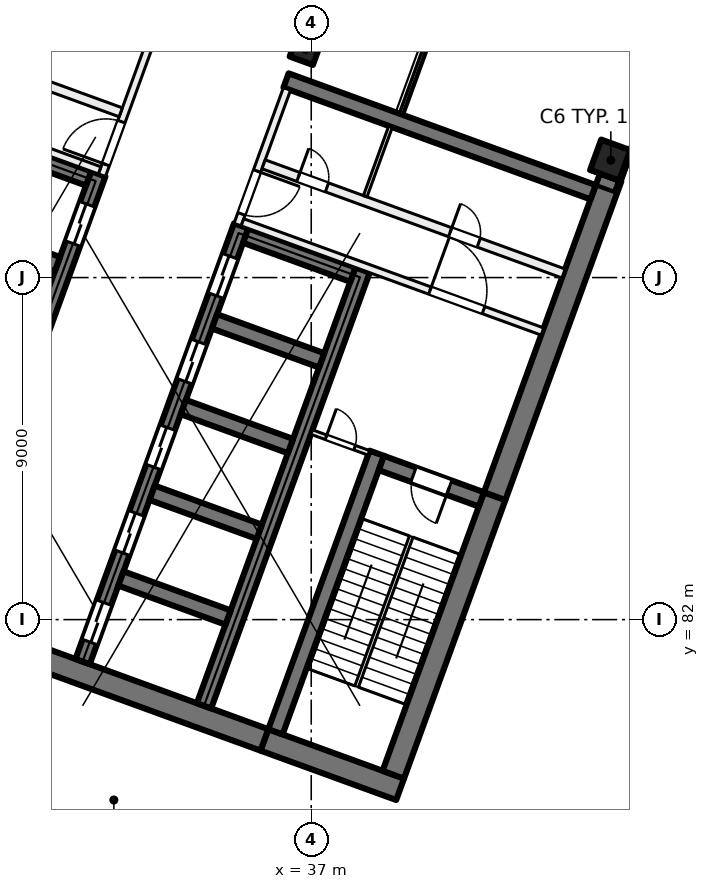
"""IFC4 building model, lengths in metres.
Left out: names, types, materials, properties, quantities, classifications, styles, units other than length and angle.
Written with IfcOpenShell. Run it as: python <this file> out.ifc"""

import sys

from ifc_helpers import new_model, si_unit, direction, frame, frame_2d, origin, origin_2d, place, context, subcontext, project, spatial, rectangle, extrude, element, fill, save


model = new_model("IFC4")
c1 = context("Model", 3, precision=1e-05, world=origin(), true_north=direction((0.0, 1.0)))
c2 = subcontext(c1, "Body", "Model", "MODEL_VIEW")
j1 = project(units=[si_unit("LENGTHUNIT", "METRE"), si_unit("PLANEANGLEUNIT", "RADIAN")], contexts=[c1])
p1 = place(None, origin())
s1 = spatial("IfcSite", under=j1, at=p1, CompositionType="ELEMENT")
p2 = place(p1, origin())
s2 = spatial("IfcBuilding", under=s1, at=p2, CompositionType="ELEMENT")
p3 = place(p2, frame((0.0, 0.0, 129.0)))
s3 = spatial("IfcBuildingStorey", under=s2, at=p3, CompositionType="ELEMENT", Elevation=129.0)
p4 = place(p3, frame((36.849, 97.011, 0.0), z_axis=(0.0, 0.0, 1.0), x_axis=(-0.342020143326, -0.939692620786, 0.0)))
e1 = element("IfcColumn", 1, at=p4, inside=s3, PredefinedType="COLUMN", context=c2, shape_type="SweptSolid", body=[
    extrude(rectangle(XDim=0.65, YDim=0.65, at=origin_2d()), origin(), (0.0, 0.0, 1.0), 5.5),
])
p5 = place(p3, frame((44.884, 94.087, 0.0), z_axis=(0.0, 0.0, 1.0), x_axis=(-0.342020143326, -0.939692620786, 0.0)))
e2 = element("IfcColumn", 2, at=p5, inside=s3, PredefinedType="COLUMN", context=c2, shape_type="SweptSolid", body=[
    extrude(rectangle(XDim=0.85, YDim=0.85, at=origin_2d()), origin(), (0.0, 0.0, 1.0), 5.5),
])
p6 = place(p3, frame((39.338, 77.535, 0.0), z_axis=(0.0, 0.0, 1.0), x_axis=(-0.939701471648, 0.341995824804, 0.0)))
e3 = element("IfcWall", 3, at=p6, inside=s3, PredefinedType="SHEAR", context=c2, shape_type="SweptSolid", body=[
    extrude(rectangle(XDim=3.8, YDim=0.6, at=frame_2d((1.9, 0.0))), origin(), (0.0, 0.0, 1.0), 5.5),
])
p7 = place(p3, frame((35.767, 78.835, 0.0), z_axis=(0.0, 0.0, 1.0), x_axis=(-0.939692894512, 0.342019391267, 0.0)))
e4 = element("IfcWall", 4, at=p7, inside=s3, PredefinedType="SHEAR", context=c2, shape_type="SweptSolid", body=[
    extrude(rectangle(XDim=14.4, YDim=0.6, at=frame_2d((7.2, 0.0))), origin(), (0.0, 0.0, 1.0), 5.5),
])
p8 = place(p3, frame((39.159, 77.92, 0.0), z_axis=(0.0, 0.0, 1.0), x_axis=(0.342016982193, 0.939693771338, 0.0)))
e5 = element("IfcWall", 5, at=p8, inside=s3, PredefinedType="SHEAR", context=c2, shape_type="SweptSolid", body=[
    extrude(rectangle(XDim=7.8, YDim=0.6, at=frame_2d((3.9, 0.0))), origin(), (0.0, 0.0, 1.0), 5.5),
])
p9 = place(p3, frame((41.827, 85.249, 0.0), z_axis=(0.0, 0.0, 1.0), x_axis=(0.342017595281, 0.939693548195, 0.0)))
e6 = element("IfcWall", 6, at=p9, inside=s3, PredefinedType="SHEAR", context=c2, shape_type="SweptSolid", body=[
    extrude(rectangle(XDim=8.925, YDim=0.6, at=frame_2d((4.462, 0.0))), origin(), (0.0, 0.0, 1.0), 5.5),
])
p10 = place(p3, frame((36.058, 79.048, 0.0), z_axis=(0.0, 0.0, 1.0), x_axis=(0.342016982193, 0.939693771338, 0.0)))
e7 = element("IfcWall", 7, at=p10, inside=s3, PredefinedType="SHEAR", context=c2, shape_type="SweptSolid", body=[
    extrude(rectangle(XDim=7.8, YDim=0.4, at=frame_2d((3.9, 0.0))), origin(), (0.0, 0.0, 1.0), 5.5),
])
p11 = place(p3, frame((41.476, 85.164, 0.0), z_axis=(0.0, 0.0, 1.0), x_axis=(-0.939678810556, 0.342058084236, 0.0)))
e8 = element("IfcWall", 8, at=p11, inside=s3, PredefinedType="SHEAR", context=c2, shape_type="SweptSolid", body=[
    extrude(rectangle(XDim=2.8, YDim=0.4, at=frame_2d((1.4, 0.0))), origin(), (0.0, 0.0, 1.0), 5.5),
])
p12 = place(p11, frame((0.9, 0.0, 0.0)))
e9 = element("IfcOpeningElement", 9, at=p12, cuts=e8, PredefinedType="OPENING", context=c2, shape_type="SweptSolid", body=[
    extrude(rectangle(XDim=1.0, YDim=2.1, at=frame_2d((0.5, 1.05))), frame((0.0, 0.21, 0.0), z_axis=(0.0, -1.0, 0.0), x_axis=(1.0, 0.0, 0.0)), (0.0, 0.0, 1.0), 0.42),
])
p13 = place(p3, frame((30.984, 80.895, 0.0), z_axis=(0.0, 0.0, 1.0), x_axis=(0.342021021735, 0.939692301071, 0.0)))
e10 = element("IfcWall", 10, at=p13, inside=s3, PredefinedType="SHEAR", context=c2, shape_type="SweptSolid", body=[
    extrude(rectangle(XDim=12.2, YDim=0.4, at=frame_2d((6.1, 0.0))), origin(), (0.0, 0.0, 1.0), 5.5),
])
p14 = place(p13, frame((0.55, 0.0, 0.0)))
e11 = element("IfcOpeningElement", 11, at=p14, cuts=e10, PredefinedType="OPENING", context=c2, shape_type="SweptSolid", body=[
    extrude(rectangle(XDim=1.1, YDim=2.1, at=frame_2d((0.55, 1.05))), frame((0.0, 0.21, 0.0), z_axis=(0.0, -1.0, 0.0), x_axis=(1.0, 0.0, 0.0)), (0.0, 0.0, 1.0), 0.42),
])
p15 = place(p13, frame((3.05, 0.0, 0.0)))
e12 = element("IfcOpeningElement", 12, at=p15, cuts=e10, PredefinedType="OPENING", context=c2, shape_type="SweptSolid", body=[
    extrude(rectangle(XDim=1.1, YDim=2.1, at=frame_2d((0.55, 1.05))), frame((0.0, 0.21, 0.0), z_axis=(0.0, -1.0, 0.0), x_axis=(1.0, 0.0, 0.0)), (0.0, 0.0, 1.0), 0.42),
])
p16 = place(p13, frame((5.45, 0.0, 0.0)))
e13 = element("IfcOpeningElement", 13, at=p16, cuts=e10, PredefinedType="OPENING", context=c2, shape_type="SweptSolid", body=[
    extrude(rectangle(XDim=1.1, YDim=2.1, at=frame_2d((0.55, 1.05))), frame((0.0, 0.21, 0.0), z_axis=(0.0, -1.0, 0.0), x_axis=(1.0, 0.0, 0.0)), (0.0, 0.0, 1.0), 0.42),
])
p17 = place(p13, frame((7.85, 0.0, 0.0)))
e14 = element("IfcOpeningElement", 14, at=p17, cuts=e10, PredefinedType="OPENING", context=c2, shape_type="SweptSolid", body=[
    extrude(rectangle(XDim=1.1, YDim=2.1, at=frame_2d((0.55, 1.05))), frame((0.0, 0.21, 0.0), z_axis=(0.0, -1.0, 0.0), x_axis=(1.0, 0.0, 0.0)), (0.0, 0.0, 1.0), 0.42),
])
p18 = place(p13, frame((10.25, 0.0, 0.0)))
e15 = element("IfcOpeningElement", 15, at=p18, cuts=e10, PredefinedType="OPENING", context=c2, shape_type="SweptSolid", body=[
    extrude(rectangle(XDim=1.1, YDim=2.1, at=frame_2d((0.55, 1.05))), frame((0.0, 0.21, 0.0), z_axis=(0.0, -1.0, 0.0), x_axis=(1.0, 0.0, 0.0)), (0.0, 0.0, 1.0), 0.42),
])
p19 = place(p3, frame((34.178, 79.732, 0.0), z_axis=(0.0, 0.0, 1.0), x_axis=(0.342014590177, 0.939694641948, 0.0)))
e16 = element("IfcWall", 16, at=p19, inside=s3, PredefinedType="SHEAR", context=c2, shape_type="SweptSolid", body=[
    extrude(rectangle(XDim=12.2, YDim=0.4, at=frame_2d((6.1, 0.0))), origin(), (0.0, 0.0, 1.0), 5.5),
])
for number, where, z_axis, x_axis in (
    (17, (34.812, 82.056, 0.0), (0.0, 0.0, 1.0), (-0.94, 0.342, 0.0)),
    (18, (35.632, 84.311, 0.0), (0.0, 0.0, 1.0), (-0.94, 0.342, 0.0)),
    (19, (36.453, 86.566, 0.0), (0.0, 0.0, 1.0), (-0.94, 0.342, 0.0)),
    (20, (37.274, 88.822, 0.0), (0.0, 0.0, 1.0), (-0.94, 0.342, 0.0)),
):
    element("IfcWall", number, at=place(p3, frame(where, z_axis=z_axis, x_axis=x_axis)), inside=s3, PredefinedType="SHEAR", context=c2, shape_type="SweptSolid", body=[
        extrude(rectangle(XDim=3.0, YDim=0.4, at=frame_2d((1.5, 0.0))), origin(), (0.0, 0.0, 1.0), 5.5),
    ])
p20 = place(p3, frame((38.095, 91.077, 0.0), z_axis=(0.0, 0.0, 1.0), x_axis=(-0.939676934218, 0.342063238742, 0.0)))
e21 = element("IfcWall", 21, at=p20, inside=s3, PredefinedType="SHEAR", context=c2, shape_type="SweptSolid", body=[
    extrude(rectangle(XDim=3.0, YDim=0.4, at=frame_2d((1.5, 0.0))), origin(), (0.0, 0.0, 1.0), 5.5),
])
p21 = place(p3, frame((27.225, 82.263, 0.0), z_axis=(0.0, 0.0, 1.0), x_axis=(0.342014590177, 0.939694641948, 0.0)))
e22 = element("IfcWall", 22, at=p21, inside=s3, PredefinedType="SHEAR", context=c2, shape_type="SweptSolid", body=[
    extrude(rectangle(XDim=12.2, YDim=0.4, at=frame_2d((6.1, 0.0))), origin(), (0.0, 0.0, 1.0), 5.5),
])
p22 = place(p21, frame((0.55, 0.0, 0.0)))
e23 = element("IfcOpeningElement", 23, at=p22, cuts=e22, PredefinedType="OPENING", context=c2, shape_type="SweptSolid", body=[
    extrude(rectangle(XDim=1.1, YDim=2.1, at=frame_2d((0.55, 1.05))), frame((0.0, 0.21, 0.0), z_axis=(0.0, -1.0, 0.0), x_axis=(1.0, 0.0, 0.0)), (0.0, 0.0, 1.0), 0.42),
])
p23 = place(p21, frame((3.05, 0.0, 0.0)))
e24 = element("IfcOpeningElement", 24, at=p23, cuts=e22, PredefinedType="OPENING", context=c2, shape_type="SweptSolid", body=[
    extrude(rectangle(XDim=1.1, YDim=2.1, at=frame_2d((0.55, 1.05))), frame((0.0, 0.21, 0.0), z_axis=(0.0, -1.0, 0.0), x_axis=(1.0, 0.0, 0.0)), (0.0, 0.0, 1.0), 0.42),
])
p24 = place(p21, frame((5.45, 0.0, 0.0)))
e25 = element("IfcOpeningElement", 25, at=p24, cuts=e22, PredefinedType="OPENING", context=c2, shape_type="SweptSolid", body=[
    extrude(rectangle(XDim=1.1, YDim=2.1, at=frame_2d((0.55, 1.05))), frame((0.0, 0.21, 0.0), z_axis=(0.0, -1.0, 0.0), x_axis=(1.0, 0.0, 0.0)), (0.0, 0.0, 1.0), 0.42),
])
p25 = place(p21, frame((10.25, 0.0, 0.0)))
e26 = element("IfcOpeningElement", 26, at=p25, cuts=e22, PredefinedType="OPENING", context=c2, shape_type="SweptSolid", body=[
    extrude(rectangle(XDim=1.1, YDim=2.1, at=frame_2d((0.55, 1.05))), frame((0.0, 0.21, 0.0), z_axis=(0.0, -1.0, 0.0), x_axis=(1.0, 0.0, 0.0)), (0.0, 0.0, 1.0), 0.42),
])
for number, where, z_axis, x_axis in (
    (27, (30.32, 91.353, 0.0), (0.0, 0.0, 1.0), (-0.94, 0.342, 0.0)),
    (28, (31.141, 93.608, 0.0), (0.0, 0.0, 1.0), (-0.94, 0.342, 0.0)),
):
    element("IfcWall", number, at=place(p3, frame(where, z_axis=z_axis, x_axis=x_axis)), inside=s3, PredefinedType="SHEAR", context=c2, shape_type="SweptSolid", body=[
        extrude(rectangle(XDim=3.0, YDim=0.4, at=frame_2d((1.5, 0.0))), origin(), (0.0, 0.0, 1.0), 5.5),
    ])
p26 = place(p3, frame((44.418, 93.245, 0.0), z_axis=(0.0, 0.0, 1.0), x_axis=(-0.93969060187, 0.342025690201, 0.0)))
e29 = element("IfcWall", 29, at=p26, inside=s3, PredefinedType="SHEAR", context=c2, shape_type="SweptSolid", body=[
    extrude(rectangle(XDim=8.6, YDim=0.4, at=frame_2d((4.3, 0.0))), origin(), (0.0, 0.0, 1.0), 5.5),
])
p27 = place(p3, frame((31.491, 93.693, 0.0), z_axis=(0.0, 0.0, 1.0), x_axis=(0.341995824804, 0.939701471648, 0.0)))
e30 = element("IfcWall", 30, at=p27, inside=s3, PredefinedType="PARTITIONING", context=c2, shape_type="SweptSolid", body=[
    extrude(rectangle(XDim=3.8, YDim=0.2, at=frame_2d((1.9, 0.0))), origin(), (0.0, 0.0, 1.0), 5.125),
])
p28 = place(p27, frame((0.3, 0.0, 0.0)))
e31 = element("IfcOpeningElement", 31, at=p28, cuts=e30, PredefinedType="OPENING", context=c2, shape_type="SweptSolid", body=[
    extrude(rectangle(XDim=1.2, YDim=2.1, at=frame_2d((0.6, 1.05))), frame((0.0, 0.11, 0.0), z_axis=(0.0, -1.0, 0.0), x_axis=(1.0, 0.0, 0.0)), (0.0, 0.0, 1.0), 0.22),
])
p29 = place(p3, frame((23.538, 96.694, 0.0), z_axis=(0.0, 0.0, 1.0), x_axis=(0.939691552312, -0.342023078919, 0.0)))
e32 = element("IfcWall", 32, at=p29, inside=s3, PredefinedType="PARTITIONING", context=c2, shape_type="SweptSolid", body=[
    extrude(rectangle(XDim=8.4, YDim=0.2, at=frame_2d((4.2, 0.0))), origin(), (0.0, 0.0, 1.0), 5.125),
])
p30 = place(p29, frame((1.65, 0.0, 0.0)))
e33 = element("IfcOpeningElement", 33, at=p30, cuts=e32, PredefinedType="OPENING", context=c2, shape_type="SweptSolid", body=[
    extrude(rectangle(XDim=1.5, YDim=2.1, at=frame_2d((0.75, 1.05))), frame((0.0, 0.11, 0.0), z_axis=(0.0, -1.0, 0.0), x_axis=(1.0, 0.0, 0.0)), (0.0, 0.0, 1.0), 0.22),
])
p31 = place(p3, frame((24.094, 98.221, 0.0), z_axis=(0.0, 0.0, 1.0), x_axis=(0.939691552312, -0.342023078919, 0.0)))
e34 = element("IfcWall", 34, at=p31, inside=s3, PredefinedType="PARTITIONING", context=c2, shape_type="SweptSolid", body=[
    extrude(rectangle(XDim=8.4, YDim=0.25, at=frame_2d((4.2, 0.0))), origin(), (0.0, 0.0, 1.0), 5.125),
])
p32 = place(p31, frame((3.8, 0.0, 0.0)))
e35 = element("IfcOpeningElement", 35, at=p32, cuts=e34, PredefinedType="OPENING", context=c2, shape_type="SweptSolid", body=[
    extrude(rectangle(XDim=0.8, YDim=2.1, at=frame_2d((0.4, 1.05))), frame((0.0, 0.135, 0.0), z_axis=(0.0, -1.0, 0.0), x_axis=(1.0, 0.0, 0.0)), (0.0, 0.0, 1.0), 0.27),
])
p33 = place(p3, frame((36.362, 95.964, 0.0), z_axis=(0.0, 0.0, 1.0), x_axis=(-0.341995824804, -0.939701471648, 0.0)))
e36 = element("IfcWall", 36, at=p33, inside=s3, PredefinedType="PARTITIONING", context=c2, shape_type="SweptSolid", body=[
    extrude(rectangle(XDim=3.8, YDim=0.2, at=frame_2d((1.9, 0.0))), origin(), (0.0, 0.0, 1.0), 5.125),
])
p34 = place(p33, frame((2.3, 0.0, 0.0)))
e37 = element("IfcOpeningElement", 37, at=p34, cuts=e36, PredefinedType="OPENING", context=c2, shape_type="SweptSolid", body=[
    extrude(rectangle(XDim=1.2, YDim=2.1, at=frame_2d((0.6, 1.05))), frame((0.0, 0.11, 0.0), z_axis=(0.0, -1.0, 0.0), x_axis=(1.0, 0.0, 0.0)), (0.0, 0.0, 1.0), 0.22),
])
p35 = place(p3, frame((35.19, 92.453, 0.0), z_axis=(0.0, 0.0, 1.0), x_axis=(0.939691552312, -0.342023078919, 0.0)))
e38 = element("IfcWall", 38, at=p35, inside=s3, PredefinedType="PARTITIONING", context=c2, shape_type="SweptSolid", body=[
    extrude(rectangle(XDim=8.4, YDim=0.2, at=frame_2d((4.2, 0.0))), origin(), (0.0, 0.0, 1.0), 5.125),
])
p36 = place(p35, frame((5.25, 0.0, 0.0)))
e39 = element("IfcOpeningElement", 39, at=p36, cuts=e38, PredefinedType="OPENING", context=c2, shape_type="SweptSolid", body=[
    extrude(rectangle(XDim=1.5, YDim=2.1, at=frame_2d((0.75, 1.05))), frame((0.0, 0.11, 0.0), z_axis=(0.0, -1.0, 0.0), x_axis=(1.0, 0.0, 0.0)), (0.0, 0.0, 1.0), 0.22),
])
p37 = place(p3, frame((35.746, 93.98, 0.0), z_axis=(0.0, 0.0, 1.0), x_axis=(0.939691552312, -0.342023078919, 0.0)))
e40 = element("IfcWall", 40, at=p37, inside=s3, PredefinedType="PARTITIONING", context=c2, shape_type="SweptSolid", body=[
    extrude(rectangle(XDim=8.4, YDim=0.25, at=frame_2d((4.2, 0.0))), origin(), (0.0, 0.0, 1.0), 5.125),
])
p38 = place(p37, frame((0.975, 0.0, 0.0)))
e41 = element("IfcOpeningElement", 41, at=p38, cuts=e40, PredefinedType="OPENING", context=c2, shape_type="SweptSolid", body=[
    extrude(rectangle(XDim=0.8, YDim=2.1, at=frame_2d((0.4, 1.05))), frame((0.0, 0.135, 0.0), z_axis=(0.0, -1.0, 0.0), x_axis=(1.0, 0.0, 0.0)), (0.0, 0.0, 1.0), 0.27),
])
p39 = place(p37, frame((5.225, 0.0, 0.0)))
e42 = element("IfcOpeningElement", 42, at=p39, cuts=e40, PredefinedType="OPENING", context=c2, shape_type="SweptSolid", body=[
    extrude(rectangle(XDim=0.8, YDim=2.1, at=frame_2d((0.4, 1.05))), frame((0.0, 0.135, 0.0), z_axis=(0.0, -1.0, 0.0), x_axis=(1.0, 0.0, 0.0)), (0.0, 0.0, 1.0), 0.27),
])
p40 = place(p3, frame((37.013, 86.935, 0.0), z_axis=(0.0, 0.0, 1.0), x_axis=(0.939659694648, -0.342110593602, 0.0)))
e43 = element("IfcWall", 43, at=p40, inside=s3, PredefinedType="PARTITIONING", context=c2, shape_type="SweptSolid", body=[
    extrude(rectangle(XDim=1.6, YDim=0.125, at=frame_2d((0.8, 0.0))), origin(), (0.0, 0.0, 1.0), 5.125),
])
p41 = place(p40, frame((0.4, 0.0, 0.0)))
e44 = element("IfcOpeningElement", 44, at=p41, cuts=e43, PredefinedType="OPENING", context=c2, shape_type="SweptSolid", body=[
    extrude(rectangle(XDim=0.8, YDim=2.1, at=frame_2d((0.4, 1.05))), frame((0.0, 0.073, 0.0), z_axis=(0.0, -1.0, 0.0), x_axis=(1.0, 0.0, 0.0)), (0.0, 0.0, 1.0), 0.145),
])
p42 = place(p3, frame((39.087, 94.973, 0.0), z_axis=(0.0, 0.0, 1.0), x_axis=(-0.342024501273, -0.939691034611, 0.0)))
e45 = element("IfcWall", 45, at=p42, inside=s3, PredefinedType="PARTITIONING", context=c2, shape_type="SweptSolid", body=[
    extrude(rectangle(XDim=1.95, YDim=0.1, at=frame_2d((0.975, 0.0))), origin(), (0.0, 0.0, 1.0), 5.125),
])
p43 = place(p25, origin())
e46 = element("IfcDoor", 46, at=p43, inside=s3, OperationType="DOUBLE_DOOR_SLIDING", PredefinedType="DOOR", context=c2, shape_type="SweptSolid", body=[
    extrude(rectangle(XDim=1.1, YDim=2.1, at=frame_2d((0.55, 1.05))), frame((0.0, 0.025, 0.0), z_axis=(0.0, -1.0, 0.0), x_axis=(1.0, 0.0, 0.0)), (0.0, 0.0, 1.0), 0.05),
])
fill(e26, e46)
p44 = place(p14, origin())
e47 = element("IfcDoor", 47, at=p44, inside=s3, OperationType="DOUBLE_DOOR_SLIDING", PredefinedType="DOOR", context=c2, shape_type="SweptSolid", body=[
    extrude(rectangle(XDim=1.1, YDim=2.1, at=frame_2d((0.55, 1.05))), frame((0.0, 0.025, 0.0), z_axis=(0.0, -1.0, 0.0), x_axis=(1.0, 0.0, 0.0)), (0.0, 0.0, 1.0), 0.05),
])
fill(e11, e47)
p45 = place(p15, origin())
e48 = element("IfcDoor", 48, at=p45, inside=s3, OperationType="DOUBLE_DOOR_SLIDING", PredefinedType="DOOR", context=c2, shape_type="SweptSolid", body=[
    extrude(rectangle(XDim=1.1, YDim=2.1, at=frame_2d((0.55, 1.05))), frame((0.0, 0.025, 0.0), z_axis=(0.0, -1.0, 0.0), x_axis=(1.0, 0.0, 0.0)), (0.0, 0.0, 1.0), 0.05),
])
fill(e12, e48)
p46 = place(p16, origin())
e49 = element("IfcDoor", 49, at=p46, inside=s3, OperationType="DOUBLE_DOOR_SLIDING", PredefinedType="DOOR", context=c2, shape_type="SweptSolid", body=[
    extrude(rectangle(XDim=1.1, YDim=2.1, at=frame_2d((0.55, 1.05))), frame((0.0, 0.025, 0.0), z_axis=(0.0, -1.0, 0.0), x_axis=(1.0, 0.0, 0.0)), (0.0, 0.0, 1.0), 0.05),
])
fill(e13, e49)
p47 = place(p17, origin())
e50 = element("IfcDoor", 50, at=p47, inside=s3, OperationType="DOUBLE_DOOR_SLIDING", PredefinedType="DOOR", context=c2, shape_type="SweptSolid", body=[
    extrude(rectangle(XDim=1.1, YDim=2.1, at=frame_2d((0.55, 1.05))), frame((0.0, 0.025, 0.0), z_axis=(0.0, -1.0, 0.0), x_axis=(1.0, 0.0, 0.0)), (0.0, 0.0, 1.0), 0.05),
])
fill(e14, e50)
p48 = place(p18, origin())
e51 = element("IfcDoor", 51, at=p48, inside=s3, OperationType="DOUBLE_DOOR_SLIDING", PredefinedType="DOOR", context=c2, shape_type="SweptSolid", body=[
    extrude(rectangle(XDim=1.1, YDim=2.1, at=frame_2d((0.55, 1.05))), frame((0.0, 0.025, 0.0), z_axis=(0.0, -1.0, 0.0), x_axis=(1.0, 0.0, 0.0)), (0.0, 0.0, 1.0), 0.05),
])
fill(e15, e51)
p49 = place(p28, origin())
e52 = element("IfcDoor", 52, at=p49, inside=s3, OperationType="DOUBLE_DOOR_SINGLE_SWING", PredefinedType="DOOR", context=c2, shape_type="SweptSolid", body=[
    extrude(rectangle(XDim=1.2, YDim=2.1, at=frame_2d((0.6, 1.05))), frame((0.0, 0.025, 0.0), z_axis=(0.0, -1.0, 0.0), x_axis=(1.0, 0.0, 0.0)), (0.0, 0.0, 1.0), 0.05),
])
fill(e31, e52)
p50 = place(p34, origin())
e53 = element("IfcDoor", 53, at=p50, inside=s3, OperationType="DOUBLE_DOOR_SINGLE_SWING", PredefinedType="DOOR", context=c2, shape_type="SweptSolid", body=[
    extrude(rectangle(XDim=1.2, YDim=2.1, at=frame_2d((0.6, 1.05))), frame((0.0, 0.025, 0.0), z_axis=(0.0, -1.0, 0.0), x_axis=(1.0, 0.0, 0.0)), (0.0, 0.0, 1.0), 0.05),
])
fill(e37, e53)
p51 = place(p36, origin())
e54 = element("IfcDoor", 54, at=p51, inside=s3, OperationType="DOUBLE_DOOR_SINGLE_SWING", PredefinedType="DOOR", context=c2, shape_type="SweptSolid", body=[
    extrude(rectangle(XDim=1.5, YDim=2.1, at=frame_2d((0.75, 1.05))), frame((0.0, 0.025, 0.0), z_axis=(0.0, -1.0, 0.0), x_axis=(1.0, 0.0, 0.0)), (0.0, 0.0, 1.0), 0.05),
])
fill(e39, e54)
p52 = place(p12, origin())
e55 = element("IfcDoor", 55, at=p52, inside=s3, OperationType="SINGLE_SWING_RIGHT", PredefinedType="DOOR", context=c2, shape_type="SweptSolid", body=[
    extrude(rectangle(XDim=1.0, YDim=2.1, at=frame_2d((0.5, 1.05))), frame((0.0, 0.025, 0.0), z_axis=(0.0, -1.0, 0.0), x_axis=(1.0, 0.0, 0.0)), (0.0, 0.0, 1.0), 0.05),
])
fill(e9, e55)
p53 = place(p41, origin())
e56 = element("IfcDoor", 56, at=p53, inside=s3, OperationType="SINGLE_SWING_LEFT", PredefinedType="DOOR", context=c2, shape_type="SweptSolid", body=[
    extrude(rectangle(XDim=0.8, YDim=2.1, at=frame_2d((0.4, 1.05))), frame((0.0, 0.025, 0.0), z_axis=(0.0, -1.0, 0.0), x_axis=(1.0, 0.0, 0.0)), (0.0, 0.0, 1.0), 0.05),
])
fill(e44, e56)
p54 = place(p38, origin())
e57 = element("IfcDoor", 57, at=p54, inside=s3, OperationType="SINGLE_SWING_RIGHT", PredefinedType="DOOR", context=c2, shape_type="SweptSolid", body=[
    extrude(rectangle(XDim=0.8, YDim=2.1, at=frame_2d((0.4, 1.05))), frame((0.0, 0.025, 0.0), z_axis=(0.0, -1.0, 0.0), x_axis=(1.0, 0.0, 0.0)), (0.0, 0.0, 1.0), 0.05),
])
fill(e41, e57)
p55 = place(p39, origin())
e58 = element("IfcDoor", 58, at=p55, inside=s3, OperationType="SINGLE_SWING_LEFT", PredefinedType="DOOR", context=c2, shape_type="SweptSolid", body=[
    extrude(rectangle(XDim=0.8, YDim=2.1, at=frame_2d((0.4, 1.05))), frame((0.0, 0.025, 0.0), z_axis=(0.0, -1.0, 0.0), x_axis=(1.0, 0.0, 0.0)), (0.0, 0.0, 1.0), 0.05),
])
fill(e42, e58)
save(model, sys.argv[1])
